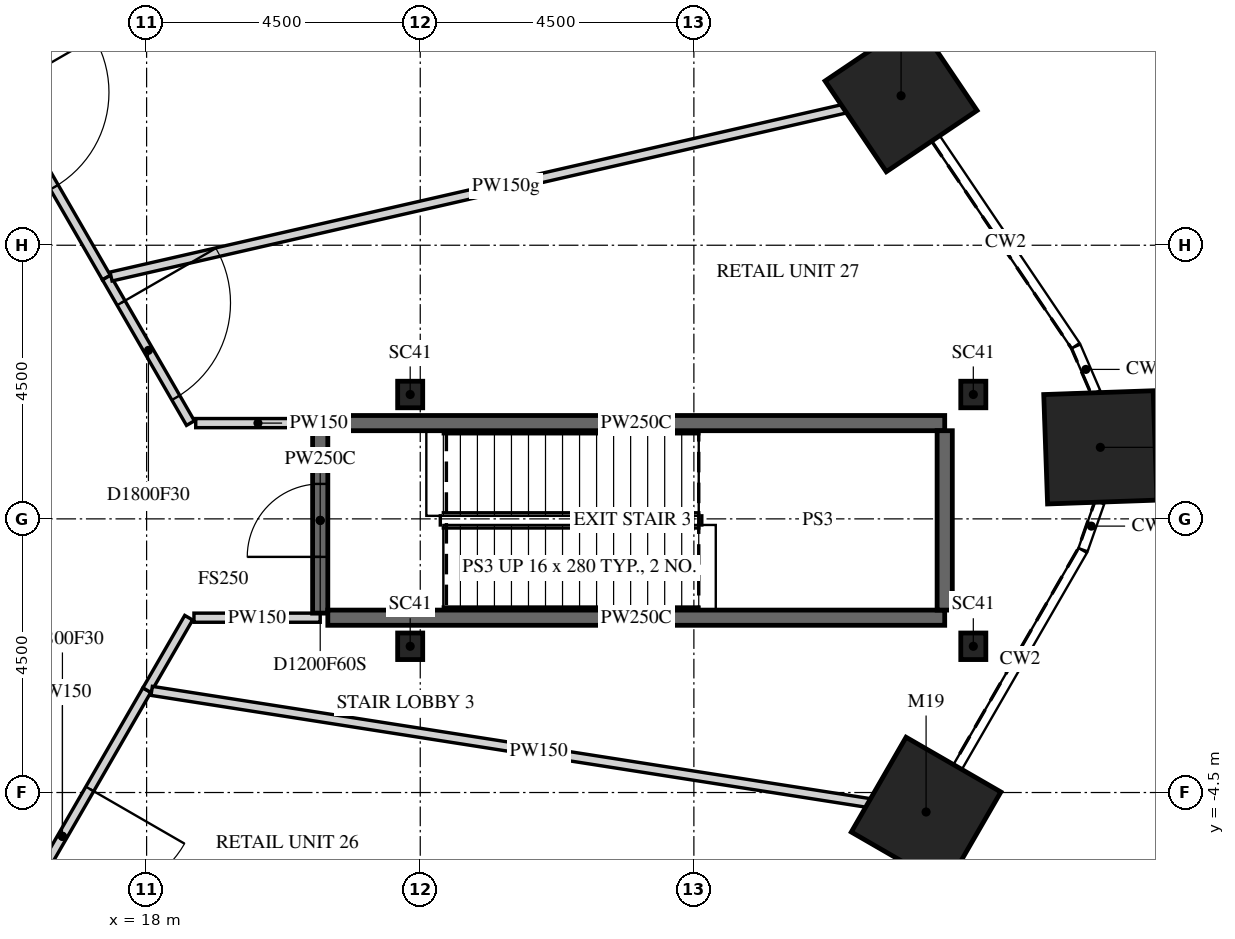
"""IFC4 building model, lengths in metres.
Left out: names, types, materials, properties, quantities, classifications, styles, units other than length and angle.
Written with IfcOpenShell. Run it as: python <this file> out.ifc"""

import sys

from ifc_helpers import new_model, si_unit, direction, frame, frame_2d, origin, origin_2d, place, context, subcontext, project, spatial, rectangle, i_section, extrude, element, fill, save


model = new_model("IFC4")
c1 = context("Model", 3, precision=1e-05, world=origin(), true_north=direction((0.0, 1.0)))
c2 = subcontext(c1, "Body", "Model", "MODEL_VIEW")
j1 = project(units=[si_unit("LENGTHUNIT", "METRE"), si_unit("PLANEANGLEUNIT", "RADIAN")], contexts=[c1])
p1 = place(None, origin())
s1 = spatial("IfcSite", under=j1, at=p1, CompositionType="ELEMENT")
p2 = place(p1, origin())
s2 = spatial("IfcBuilding", under=s1, at=p2, CompositionType="ELEMENT")
p3 = place(p2, frame((0.0, 0.0, 15.0)))
s3 = spatial("IfcBuildingStorey", under=s2, at=p3, CompositionType="ELEMENT", Elevation=15.0)
for number, where, z_axis, x_axis in (
    (1, (30.819, -4.82, -0.25), (0.0, 0.0, 1.0), (-0.5, -0.866, 0.0)),
    (2, (33.685, 1.176, -0.25), (0.0, 0.0, 1.0), (0.035, -0.999, 0.0)),
    (3, (30.407, 6.958, -0.25), (0.0, 0.0, 1.0), (0.559, -0.829, 0.0)),
):
    element("IfcColumn", number, at=place(p3, frame(where, z_axis=z_axis, x_axis=x_axis)), inside=s3, PredefinedType="COLUMN", context=c2, shape_type="SweptSolid", body=[
        extrude(rectangle(XDim=1.8, YDim=1.8, at=origin_2d()), origin(), (0.0, 0.0, 1.0), 5.5),
    ])
for number, where, z_axis, x_axis in (
    (4, (31.595, 2.045, -0.25), (0.0, 0.0, 1.0), (1.0, 0.0, 0.0)),
    (5, (31.595, -2.095, -0.25), (0.0, 0.0, 1.0), (1.0, 0.0, 0.0)),
    (6, (22.335, -2.095, -0.25), (0.0, 0.0, 1.0), (1.0, 0.0, 0.0)),
    (7, (22.335, 2.045, -0.25), (0.0, 0.0, 1.0), (1.0, 0.0, 0.0)),
):
    element("IfcColumn", number, at=place(p3, frame(where, z_axis=z_axis, x_axis=x_axis)), inside=s3, PredefinedType="COLUMN", context=c2, shape_type="SweptSolid", body=[
        extrude(i_section(OverallWidth=0.412, OverallDepth=0.437, WebThickness=0.036, FlangeThickness=0.058, FilletRadius=0.015, at=origin_2d()), origin(), (0.0, 0.0, 1.0), 5.5),
    ])
p4 = place(p3, frame((18.004, -2.816, 0.0), z_axis=(0.0, 0.0, 1.0), x_axis=(-0.500011685716, -0.866018656928, 0.0)))
e8 = element("IfcWall", 8, at=p4, inside=s3, PredefinedType="PARTITIONING", context=c2, shape_type="SweptSolid", body=[
    extrude(rectangle(XDim=5.553, YDim=0.15, at=frame_2d((2.776, 0.0))), origin(), (0.0, 0.0, 1.0), 5.25),
])
p5 = place(p4, frame((1.876, 0.0, 0.0)))
e9 = element("IfcOpeningElement", 9, at=p5, cuts=e8, PredefinedType="OPENING", context=c2, shape_type="SweptSolid", body=[
    extrude(rectangle(XDim=1.8, YDim=2.1, at=frame_2d((0.9, 1.05))), frame((0.0, 0.085, 0.0), z_axis=(0.0, -1.0, 0.0), x_axis=(1.0, 0.0, 0.0)), (0.0, 0.0, 1.0), 0.17),
])
p6 = place(p3, frame((14.723, 8.5, 0.0), z_axis=(0.0, 0.0, 1.0), x_axis=(0.499952654668, -0.866052736899, 0.0)))
e10 = element("IfcWall", 10, at=p6, inside=s3, PredefinedType="PARTITIONING", context=c2, shape_type="SweptSolid", body=[
    extrude(rectangle(XDim=5.233, YDim=0.15, at=frame_2d((2.616, 0.0))), origin(), (0.0, 0.0, 1.0), 5.25),
])
p7 = place(p6, frame((1.716, 0.0, 0.0)))
e11 = element("IfcOpeningElement", 11, at=p7, cuts=e10, PredefinedType="OPENING", context=c2, shape_type="SweptSolid", body=[
    extrude(rectangle(XDim=1.8, YDim=2.1, at=frame_2d((0.9, 1.05))), frame((0.0, 0.085, 0.0), z_axis=(0.0, -1.0, 0.0), x_axis=(1.0, 0.0, 0.0)), (0.0, 0.0, 1.0), 0.17),
])
p8 = place(p3, frame((18.004, -2.816, 0.0), z_axis=(0.0, 0.0, 1.0), x_axis=(0.500224363519, 0.865895828689, 0.0)))
e12 = element("IfcWall", 12, at=p8, inside=s3, PredefinedType="PARTITIONING", context=c2, shape_type="SweptSolid", body=[
    extrude(rectangle(XDim=1.375, YDim=0.15, at=frame_2d((0.688, 0.0))), origin(), (0.0, 0.0, 1.0), 5.25),
])
p9 = place(p3, frame((17.339, 3.968, 0.0), z_axis=(0.0, 0.0, 1.0), x_axis=(0.500053847239, -0.865994312834, 0.0)))
e13 = element("IfcWall", 13, at=p9, inside=s3, PredefinedType="PARTITIONING", context=c2, shape_type="SweptSolid", body=[
    extrude(rectangle(XDim=2.763, YDim=0.15, at=frame_2d((1.382, 0.0))), origin(), (0.0, 0.0, 1.0), 5.25),
])
p10 = place(p9, frame((0.482, 0.0, 0.0)))
e14 = element("IfcOpeningElement", 14, at=p10, cuts=e13, PredefinedType="OPENING", context=c2, shape_type="SweptSolid", body=[
    extrude(rectangle(XDim=1.8, YDim=2.1, at=frame_2d((0.9, 1.05))), frame((0.0, 0.085, 0.0), z_axis=(0.0, -1.0, 0.0), x_axis=(1.0, 0.0, 0.0)), (0.0, 0.0, 1.0), 0.17),
])
p11 = place(p3, frame((18.808, 1.575, 0.0), z_axis=(0.0, 0.0, 1.0), x_axis=(1.0, 0.0, 0.0)))
e15 = element("IfcWall", 15, at=p11, inside=s3, PredefinedType="PARTITIONING", context=c2, shape_type="SweptSolid", body=[
    extrude(rectangle(XDim=2.047, YDim=0.15, at=frame_2d((1.024, 0.0))), origin(), (0.0, 0.0, 1.0), 5.25),
])
p12 = place(p3, frame((20.855, -1.625, 0.0), z_axis=(0.0, 0.0, 1.0), x_axis=(-1.0, 0.0, 0.0)))
e16 = element("IfcWall", 16, at=p12, inside=s3, PredefinedType="PARTITIONING", context=c2, shape_type="SweptSolid", body=[
    extrude(rectangle(XDim=2.076, YDim=0.15, at=frame_2d((1.038, 0.0))), origin(), (0.0, 0.0, 1.0), 5.25),
])
p13 = place(p3, frame((20.855, -1.55, 0.0), z_axis=(0.0, 0.0, 1.0), x_axis=(0.0, 1.0, 0.0)))
e17 = element("IfcWall", 17, at=p13, inside=s3, PredefinedType="PARTITIONING", context=c2, shape_type="SweptSolid", body=[
    extrude(rectangle(XDim=3.05, YDim=0.25, at=frame_2d((1.525, 0.0))), origin(), (0.0, 0.0, 1.0), 5.25),
])
p14 = place(p13, frame((0.925, 0.0, 0.0)))
e18 = element("IfcOpeningElement", 18, at=p14, cuts=e17, PredefinedType="OPENING", context=c2, shape_type="SweptSolid", body=[
    extrude(rectangle(XDim=1.2, YDim=2.1, at=frame_2d((0.6, 1.05))), frame((0.0, 0.135, 0.0), z_axis=(0.0, -1.0, 0.0), x_axis=(1.0, 0.0, 0.0)), (0.0, 0.0, 1.0), 0.27),
])
p15 = place(p3, frame((20.98, 1.575, 0.0), z_axis=(0.0, 0.0, 1.0), x_axis=(1.0, 0.0, 0.0)))
e19 = element("IfcWall", 19, at=p15, inside=s3, PredefinedType="PARTITIONING", context=c2, shape_type="SweptSolid", body=[
    extrude(rectangle(XDim=10.145, YDim=0.25, at=frame_2d((5.073, 0.0))), origin(), (0.0, 0.0, 1.0), 5.25),
])
p16 = place(p3, frame((30.407, 6.958, 0.0), z_axis=(0.0, 0.0, 1.0), x_axis=(-0.974810618682, -0.223034207477, 0.0)))
e20 = element("IfcWall", 20, at=p16, inside=s3, PredefinedType="PARTITIONING", context=c2, shape_type="SweptSolid", body=[
    extrude(rectangle(XDim=13.327, YDim=0.15, at=frame_2d((6.664, 0.0))), origin(), (0.0, 0.0, 1.0), 4.488),
])
p17 = place(p3, frame((30.819, -4.82, 0.0), z_axis=(0.0, 0.0, 1.0), x_axis=(-0.98799117117, 0.154510341693, 0.0)))
e21 = element("IfcWall", 21, at=p17, inside=s3, PredefinedType="PARTITIONING", context=c2, shape_type="SweptSolid", body=[
    extrude(rectangle(XDim=12.89, YDim=0.15, at=frame_2d((6.445, 0.0))), origin(), (0.0, 0.0, 1.0), 5.25),
])
p18 = place(p3, frame((31.125, -1.625, 0.0), z_axis=(0.0, 0.0, 1.0), x_axis=(-1.0, 0.0, 0.0)))
e22 = element("IfcWall", 22, at=p18, inside=s3, PredefinedType="PARTITIONING", context=c2, shape_type="SweptSolid", body=[
    extrude(rectangle(XDim=10.145, YDim=0.25, at=frame_2d((5.073, 0.0))), origin(), (0.0, 0.0, 1.0), 5.25),
])
p19 = place(p3, frame((31.125, 1.45, 0.0), z_axis=(0.0, 0.0, 1.0), x_axis=(0.0, -1.0, 0.0)))
e23 = element("IfcWall", 23, at=p19, inside=s3, PredefinedType="PARTITIONING", context=c2, shape_type="SweptSolid", body=[
    extrude(rectangle(XDim=2.95, YDim=0.25, at=frame_2d((1.475, 0.0))), origin(), (0.0, 0.0, 1.0), 5.25),
])
p20 = place(p5, origin())
e24 = element("IfcDoor", 24, at=p20, inside=s3, OperationType="DOUBLE_DOOR_SINGLE_SWING", PredefinedType="DOOR", context=c2, shape_type="SweptSolid", body=[
    extrude(rectangle(XDim=1.8, YDim=2.1, at=frame_2d((0.9, 1.05))), frame((0.0, 0.025, 0.0), z_axis=(0.0, -1.0, 0.0), x_axis=(1.0, 0.0, 0.0)), (0.0, 0.0, 1.0), 0.05),
])
fill(e9, e24)
p21 = place(p7, origin())
e25 = element("IfcDoor", 25, at=p21, inside=s3, OperationType="DOUBLE_DOOR_SINGLE_SWING", PredefinedType="DOOR", context=c2, shape_type="SweptSolid", body=[
    extrude(rectangle(XDim=1.8, YDim=2.1, at=frame_2d((0.9, 1.05))), frame((0.0, 0.025, 0.0), z_axis=(0.0, -1.0, 0.0), x_axis=(1.0, 0.0, 0.0)), (0.0, 0.0, 1.0), 0.05),
])
fill(e11, e25)
p22 = place(p10, origin())
e26 = element("IfcDoor", 26, at=p22, inside=s3, OperationType="DOUBLE_DOOR_SINGLE_SWING", PredefinedType="DOOR", context=c2, shape_type="SweptSolid", body=[
    extrude(rectangle(XDim=1.8, YDim=2.1, at=frame_2d((0.9, 1.05))), frame((0.0, 0.025, 0.0), z_axis=(0.0, -1.0, 0.0), x_axis=(1.0, 0.0, 0.0)), (0.0, 0.0, 1.0), 0.05),
])
fill(e14, e26)
p23 = place(p14, origin())
e27 = element("IfcDoor", 27, at=p23, inside=s3, OperationType="SINGLE_SWING_LEFT", PredefinedType="DOOR", context=c2, shape_type="SweptSolid", body=[
    extrude(rectangle(XDim=1.2, YDim=2.1, at=frame_2d((0.6, 1.05))), frame((0.0, 0.025, 0.0), z_axis=(0.0, -1.0, 0.0), x_axis=(1.0, 0.0, 0.0)), (0.0, 0.0, 1.0), 0.05),
])
fill(e18, e27)
save(model, sys.argv[1])
